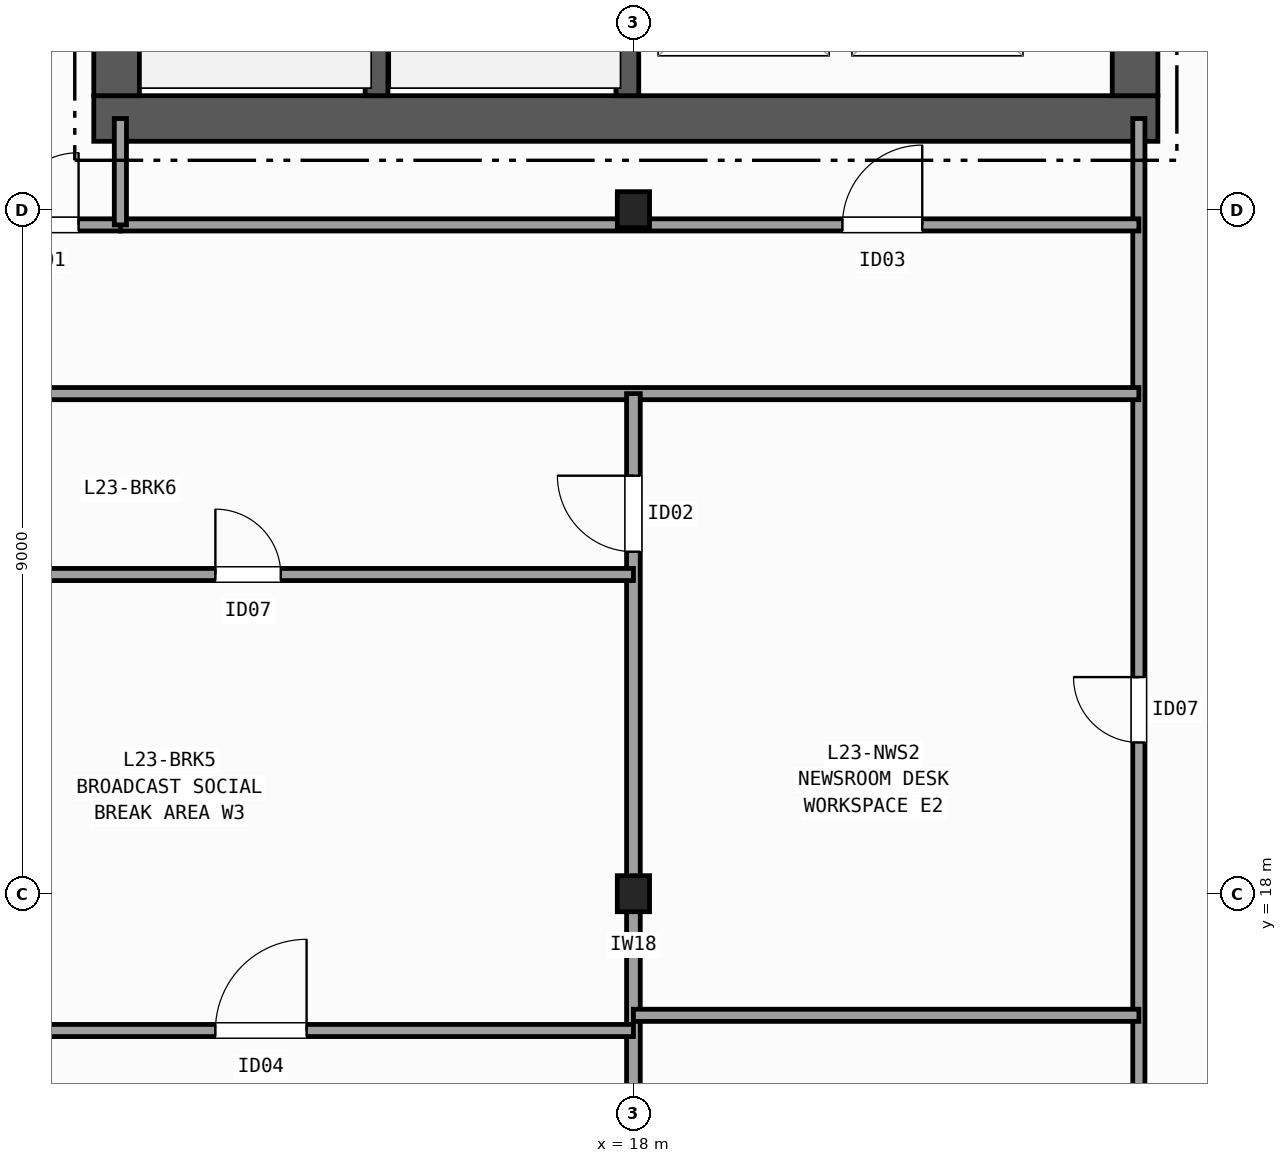
"""IFC4 building model, lengths in metres.
Left out: names, types, materials, properties, quantities, classifications, styles, units other than length and angle.
Written with IfcOpenShell. Run it as: python <this file> out.ifc"""

import sys

from ifc_helpers import new_model, si_unit, direction, frame, frame_2d, origin, origin_2d, place, context, subcontext, project, spatial, rectangle, i_section, extrude, element, fill, save


model = new_model("IFC4")
c1 = context("Model", 3, precision=1e-05, world=origin(), true_north=direction((0.0, 1.0)))
c2 = subcontext(c1, "Body", "Model", "MODEL_VIEW")
j1 = project(units=[si_unit("LENGTHUNIT", "METRE"), si_unit("PLANEANGLEUNIT", "RADIAN")], contexts=[c1])
p1 = place(None, origin())
s1 = spatial("IfcSite", under=j1, at=p1, CompositionType="ELEMENT")
p2 = place(p1, origin())
s2 = spatial("IfcBuilding", under=s1, at=p2, CompositionType="ELEMENT")
p3 = place(p2, frame((0.0, 0.0, 96.5)))
s3 = spatial("IfcBuildingStorey", under=s2, at=p3, CompositionType="ELEMENT", Elevation=96.5)
for number, where, z_axis, x_axis in (
    (1, (18.0, 18.0, 0.0), (0.0, 0.0, 1.0), (1.0, 0.0, 0.0)),
    (2, (18.0, 27.0, 0.0), (0.0, 0.0, 1.0), (1.0, 0.0, 0.0)),
):
    element("IfcColumn", number, at=place(p3, frame(where, z_axis=z_axis, x_axis=x_axis)), inside=s3, PredefinedType="COLUMN", context=c2, shape_type="SweptSolid", body=[
        extrude(i_section(OverallWidth=0.424, OverallDepth=0.474, WebThickness=0.048, FlangeThickness=0.077, FilletRadius=0.015, at=origin_2d()), origin(), (0.0, 0.0, 1.0), 3.7),
    ])
p4 = place(p3, frame((10.9, 28.2, 0.0), z_axis=(0.0, 0.0, 1.0), x_axis=(1.0, 0.0, 0.0)))
e3 = element("IfcWall", 3, at=p4, inside=s3, PredefinedType="SHEAR", context=c2, shape_type="SweptSolid", body=[
    extrude(rectangle(XDim=14.0, YDim=0.6, at=frame_2d((7.0, 0.0))), origin(), (0.0, 0.0, 1.0), 3.37),
])
p5 = place(p3, frame((11.2, 42.1, 0.0), z_axis=(0.0, 0.0, 1.0), x_axis=(0.0, -1.0, 0.0)))
e4 = element("IfcWall", 4, at=p5, inside=s3, PredefinedType="SHEAR", context=c2, shape_type="SweptSolid", body=[
    extrude(rectangle(XDim=13.6, YDim=0.6, at=frame_2d((6.8, 0.0))), origin(), (0.0, 0.0, 1.0), 3.37),
])
p6 = place(p3, frame((24.6, 28.5, 0.0), z_axis=(0.0, 0.0, 1.0), x_axis=(0.0, 1.0, 0.0)))
e5 = element("IfcWall", 5, at=p6, inside=s3, PredefinedType="SHEAR", context=c2, shape_type="SweptSolid", body=[
    extrude(rectangle(XDim=13.6, YDim=0.6, at=frame_2d((6.8, 0.0))), origin(), (0.0, 0.0, 1.0), 3.37),
])
p7 = place(p6, frame((3.3, 0.0, 0.0)))
e6 = element("IfcOpeningElement", 6, at=p7, cuts=e5, PredefinedType="OPENING", context=c2, shape_type="SweptSolid", body=[
    extrude(rectangle(XDim=1.5, YDim=2.2, at=frame_2d((0.75, 1.1))), frame((0.0, 0.31, 0.0), z_axis=(0.0, -1.0, 0.0), x_axis=(1.0, 0.0, 0.0)), (0.0, 0.0, 1.0), 0.62),
])
p8 = place(p6, frame((9.9, 0.0, 0.0)))
e7 = element("IfcOpeningElement", 7, at=p8, cuts=e5, PredefinedType="OPENING", context=c2, shape_type="SweptSolid", body=[
    extrude(rectangle(XDim=0.9, YDim=2.1, at=frame_2d((0.45, 1.05))), frame((0.0, 0.31, 0.0), z_axis=(0.0, -1.0, 0.0), x_axis=(1.0, 0.0, 0.0)), (0.0, 0.0, 1.0), 0.62),
])
p9 = place(p6, frame((12.0, 0.0, 0.0)))
e8 = element("IfcOpeningElement", 8, at=p9, cuts=e5, PredefinedType="OPENING", context=c2, shape_type="SweptSolid", body=[
    extrude(rectangle(XDim=0.9, YDim=2.1, at=frame_2d((0.45, 1.05))), frame((0.0, 0.31, 0.0), z_axis=(0.0, -1.0, 0.0), x_axis=(1.0, 0.0, 0.0)), (0.0, 0.0, 1.0), 0.62),
])
p10 = place(p3, frame((14.62, 28.5, 0.0), z_axis=(0.0, 0.0, 1.0), x_axis=(0.0, 1.0, 0.0)))
e9 = element("IfcWall", 9, at=p10, inside=s3, PredefinedType="SHEAR", context=c2, shape_type="SweptSolid", body=[
    extrude(rectangle(XDim=8.95, YDim=0.3, at=frame_2d((4.475, 0.0))), origin(), (0.0, 0.0, 1.0), 3.37),
])
p11 = place(p3, frame((17.92, 42.1, 0.0), z_axis=(0.0, 0.0, 1.0), x_axis=(0.0, -1.0, 0.0)))
e10 = element("IfcWall", 10, at=p11, inside=s3, PredefinedType="SHEAR", context=c2, shape_type="SweptSolid", body=[
    extrude(rectangle(XDim=13.6, YDim=0.3, at=frame_2d((6.8, 0.0))), origin(), (0.0, 0.0, 1.0), 3.37),
])
p12 = place(p11, frame((1.925, 0.0, 0.0)))
e11 = element("IfcOpeningElement", 11, at=p12, cuts=e10, PredefinedType="OPENING", context=c2, shape_type="SweptSolid", body=[
    extrude(rectangle(XDim=1.15, YDim=2.15, at=frame_2d((0.575, 1.075))), frame((0.0, 0.16, 0.0), z_axis=(0.0, -1.0, 0.0), x_axis=(1.0, 0.0, 0.0)), (0.0, 0.0, 1.0), 0.32),
])
p13 = place(p3, frame((9.0, 26.8, 0.0), z_axis=(0.0, 0.0, 1.0), x_axis=(1.0, 0.0, 0.0)))
e12 = element("IfcWall", 12, at=p13, inside=s3, PredefinedType="PARTITIONING", context=c2, shape_type="SweptSolid", body=[
    extrude(rectangle(XDim=2.25, YDim=0.16, at=frame_2d((1.125, 0.0))), origin(), (0.0, 0.0, 1.0), 2.577),
])
p14 = place(p13, frame((0.75, 0.0, 0.0)))
e13 = element("IfcOpeningElement", 13, at=p14, cuts=e12, PredefinedType="OPENING", context=c2, shape_type="SweptSolid", body=[
    extrude(rectangle(XDim=0.95, YDim=2.1, at=frame_2d((0.475, 1.05))), frame((0.0, 0.09, 0.0), z_axis=(0.0, -1.0, 0.0), x_axis=(1.0, 0.0, 0.0)), (0.0, 0.0, 1.0), 0.18),
])
p15 = place(p3, frame((24.65, 9.0, 0.0), z_axis=(0.0, 0.0, 1.0), x_axis=(0.0, 1.0, 0.0)))
e14 = element("IfcWall", 14, at=p15, inside=s3, PredefinedType="PARTITIONING", context=c2, shape_type="SweptSolid", body=[
    extrude(rectangle(XDim=19.2, YDim=0.16, at=frame_2d((9.6, 0.0))), origin(), (0.0, 0.0, 1.0), 2.577),
])
p16 = place(p15, frame((3.2, 0.0, 0.0)))
e15 = element("IfcOpeningElement", 15, at=p16, cuts=e14, PredefinedType="OPENING", context=c2, shape_type="SweptSolid", body=[
    extrude(rectangle(XDim=1.2, YDim=2.15, at=frame_2d((0.6, 1.075))), frame((0.0, 0.09, 0.0), z_axis=(0.0, -1.0, 0.0), x_axis=(1.0, 0.0, 0.0)), (0.0, 0.0, 1.0), 0.18),
])
p17 = place(p15, frame((10.99, 0.0, 0.0)))
e16 = element("IfcOpeningElement", 16, at=p17, cuts=e14, PredefinedType="OPENING", context=c2, shape_type="SweptSolid", body=[
    extrude(rectangle(XDim=0.86, YDim=2.05, at=frame_2d((0.43, 1.025))), frame((0.0, 0.09, 0.0), z_axis=(0.0, -1.0, 0.0), x_axis=(1.0, 0.0, 0.0)), (0.0, 0.0, 1.0), 0.18),
])
p18 = place(p3, frame((9.0, 24.58, 0.0), z_axis=(0.0, 0.0, 1.0), x_axis=(1.0, 0.0, 0.0)))
e17 = element("IfcWall", 17, at=p18, inside=s3, PredefinedType="PARTITIONING", context=c2, shape_type="SweptSolid", body=[
    extrude(rectangle(XDim=15.65, YDim=0.16, at=frame_2d((7.825, 0.0))), origin(), (0.0, 0.0, 1.0), 2.577),
])
p19 = place(p3, frame((11.25, 26.8, 0.0), z_axis=(0.0, 0.0, 1.0), x_axis=(1.0, 0.0, 0.0)))
e18 = element("IfcWall", 18, at=p19, inside=s3, PredefinedType="PARTITIONING", context=c2, shape_type="SweptSolid", body=[
    extrude(rectangle(XDim=13.4, YDim=0.16, at=frame_2d((6.7, 0.0))), origin(), (0.0, 0.0, 1.0), 2.739),
])
p20 = place(p19, frame((9.5, 0.0, 0.0)))
e19 = element("IfcOpeningElement", 19, at=p20, cuts=e18, PredefinedType="OPENING", context=c2, shape_type="SweptSolid", body=[
    extrude(rectangle(XDim=1.05, YDim=2.15, at=frame_2d((0.525, 1.075))), frame((0.0, 0.09, 0.0), z_axis=(0.0, -1.0, 0.0), x_axis=(1.0, 0.0, 0.0)), (0.0, 0.0, 1.0), 0.18),
])
p21 = place(p3, frame((11.25, 26.8, 0.0), z_axis=(0.0, 0.0, 1.0), x_axis=(0.0, 1.0, 0.0)))
e20 = element("IfcWall", 20, at=p21, inside=s3, PredefinedType="PARTITIONING", context=c2, shape_type="SweptSolid", body=[
    extrude(rectangle(XDim=1.4, YDim=0.16, at=frame_2d((0.7, 0.0))), origin(), (0.0, 0.0, 1.0), 2.739),
])
p22 = place(p3, frame((18.0, 9.0, 0.0), z_axis=(0.0, 0.0, 1.0), x_axis=(0.0, 1.0, 0.0)))
e21 = element("IfcWall", 21, at=p22, inside=s3, PredefinedType="PARTITIONING", context=c2, shape_type="SweptSolid", body=[
    extrude(rectangle(XDim=15.58, YDim=0.18, at=frame_2d((7.79, 0.0))), origin(), (0.0, 0.0, 1.0), 2.577),
])
p23 = place(p22, frame((2.2, 0.0, 0.0)))
e22 = element("IfcOpeningElement", 22, at=p23, cuts=e21, PredefinedType="OPENING", context=c2, shape_type="SweptSolid", body=[
    extrude(rectangle(XDim=0.95, YDim=2.1, at=frame_2d((0.475, 1.05))), frame((0.0, 0.1, 0.0), z_axis=(0.0, -1.0, 0.0), x_axis=(1.0, 0.0, 0.0)), (0.0, 0.0, 1.0), 0.2),
])
p24 = place(p22, frame((13.5, 0.0, 0.0)))
e23 = element("IfcOpeningElement", 23, at=p24, cuts=e21, PredefinedType="OPENING", context=c2, shape_type="SweptSolid", body=[
    extrude(rectangle(XDim=1.0, YDim=2.1, at=frame_2d((0.5, 1.05))), frame((0.0, 0.1, 0.0), z_axis=(0.0, -1.0, 0.0), x_axis=(1.0, 0.0, 0.0)), (0.0, 0.0, 1.0), 0.2),
])
p25 = place(p3, frame((18.0, 16.4, 0.0), z_axis=(0.0, 0.0, 1.0), x_axis=(1.0, 0.0, 0.0)))
e24 = element("IfcWall", 24, at=p25, inside=s3, PredefinedType="PARTITIONING", context=c2, shape_type="SweptSolid", body=[
    extrude(rectangle(XDim=6.65, YDim=0.16, at=frame_2d((3.325, 0.0))), origin(), (0.0, 0.0, 1.0), 2.742),
])
p26 = place(p3, frame((9.0, 16.2, 0.0), z_axis=(0.0, 0.0, 1.0), x_axis=(1.0, 0.0, 0.0)))
e25 = element("IfcWall", 25, at=p26, inside=s3, PredefinedType="PARTITIONING", context=c2, shape_type="SweptSolid", body=[
    extrude(rectangle(XDim=9.0, YDim=0.16, at=frame_2d((4.5, 0.0))), origin(), (0.0, 0.0, 1.0), 2.742),
])
p27 = place(p26, frame((3.5, 0.0, 0.0)))
e26 = element("IfcOpeningElement", 26, at=p27, cuts=e25, PredefinedType="OPENING", context=c2, shape_type="SweptSolid", body=[
    extrude(rectangle(XDim=1.2, YDim=2.15, at=frame_2d((0.6, 1.075))), frame((0.0, 0.09, 0.0), z_axis=(0.0, -1.0, 0.0), x_axis=(1.0, 0.0, 0.0)), (0.0, 0.0, 1.0), 0.18),
])
p28 = place(p3, frame((9.0, 22.2, 0.0), z_axis=(0.0, 0.0, 1.0), x_axis=(1.0, 0.0, 0.0)))
e27 = element("IfcWall", 27, at=p28, inside=s3, PredefinedType="PARTITIONING", context=c2, shape_type="SweptSolid", body=[
    extrude(rectangle(XDim=9.0, YDim=0.16, at=frame_2d((4.5, 0.0))), origin(), (0.0, 0.0, 1.0), 2.577),
])
p29 = place(p28, frame((3.5, 0.0, 0.0)))
e28 = element("IfcOpeningElement", 28, at=p29, cuts=e27, PredefinedType="OPENING", context=c2, shape_type="SweptSolid", body=[
    extrude(rectangle(XDim=0.86, YDim=2.05, at=frame_2d((0.43, 1.025))), frame((0.0, 0.09, 0.0), z_axis=(0.0, -1.0, 0.0), x_axis=(1.0, 0.0, 0.0)), (0.0, 0.0, 1.0), 0.18),
])
p30 = place(p14, origin())
e29 = element("IfcDoor", 29, at=p30, inside=s3, OperationType="SINGLE_SWING_RIGHT", PredefinedType="DOOR", context=c2, shape_type="SweptSolid", body=[
    extrude(rectangle(XDim=0.95, YDim=2.1, at=frame_2d((0.475, 1.05))), frame((0.0, 0.025, 0.0), z_axis=(0.0, -1.0, 0.0), x_axis=(1.0, 0.0, 0.0)), (0.0, 0.0, 1.0), 0.05),
])
fill(e13, e29)
p31 = place(p20, origin())
e30 = element("IfcDoor", 30, at=p31, inside=s3, OperationType="SINGLE_SWING_RIGHT", PredefinedType="DOOR", context=c2, shape_type="SweptSolid", body=[
    extrude(rectangle(XDim=1.05, YDim=2.15, at=frame_2d((0.525, 1.075))), frame((0.0, 0.025, 0.0), z_axis=(0.0, -1.0, 0.0), x_axis=(1.0, 0.0, 0.0)), (0.0, 0.0, 1.0), 0.05),
])
fill(e19, e30)
p32 = place(p17, origin())
e31 = element("IfcDoor", 31, at=p32, inside=s3, OperationType="SINGLE_SWING_RIGHT", PredefinedType="DOOR", context=c2, shape_type="SweptSolid", body=[
    extrude(rectangle(XDim=0.86, YDim=2.05, at=frame_2d((0.43, 1.025))), frame((0.0, 0.025, 0.0), z_axis=(0.0, -1.0, 0.0), x_axis=(1.0, 0.0, 0.0)), (0.0, 0.0, 1.0), 0.05),
])
fill(e16, e31)
p33 = place(p24, origin())
e32 = element("IfcDoor", 32, at=p33, inside=s3, OperationType="SINGLE_SWING_RIGHT", PredefinedType="DOOR", context=c2, shape_type="SweptSolid", body=[
    extrude(rectangle(XDim=1.0, YDim=2.1, at=frame_2d((0.5, 1.05))), frame((0.0, 0.025, 0.0), z_axis=(0.0, -1.0, 0.0), x_axis=(1.0, 0.0, 0.0)), (0.0, 0.0, 1.0), 0.05),
])
fill(e23, e32)
p34 = place(p27, origin())
e33 = element("IfcDoor", 33, at=p34, inside=s3, OperationType="SINGLE_SWING_RIGHT", PredefinedType="DOOR", context=c2, shape_type="SweptSolid", body=[
    extrude(rectangle(XDim=1.2, YDim=2.15, at=frame_2d((0.6, 1.075))), frame((0.0, 0.025, 0.0), z_axis=(0.0, -1.0, 0.0), x_axis=(1.0, 0.0, 0.0)), (0.0, 0.0, 1.0), 0.05),
])
fill(e26, e33)
p35 = place(p29, origin())
e34 = element("IfcDoor", 34, at=p35, inside=s3, OperationType="SINGLE_SWING_LEFT", PredefinedType="DOOR", context=c2, shape_type="SweptSolid", body=[
    extrude(rectangle(XDim=0.86, YDim=2.05, at=frame_2d((0.43, 1.025))), frame((0.0, 0.025, 0.0), z_axis=(0.0, -1.0, 0.0), x_axis=(1.0, 0.0, 0.0)), (0.0, 0.0, 1.0), 0.05),
])
fill(e28, e34)
save(model, sys.argv[1])
